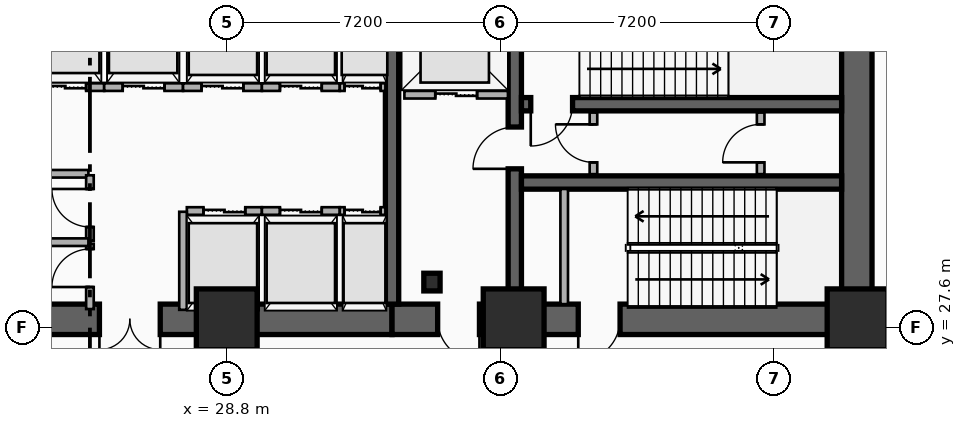
"""IFC4 building model, lengths in metres.
Left out: names, types, materials, properties, quantities, classifications, styles, units other than length and angle.
Written with IfcOpenShell. Run it as: python <this file> out.ifc"""

import sys

from ifc_helpers import new_model, si_unit, direction, frame, frame_2d, origin, origin_2d, place, context, subcontext, project, spatial, rectangle, i_section, extrude, element, fill, save


model = new_model("IFC4")
c1 = context("Model", 3, precision=1e-05, world=origin(), true_north=direction((0.0, 1.0)))
c2 = subcontext(c1, "Body", "Model", "MODEL_VIEW")
j1 = project(units=[si_unit("LENGTHUNIT", "METRE"), si_unit("PLANEANGLEUNIT", "RADIAN")], contexts=[c1])
p1 = place(None, origin())
s1 = spatial("IfcSite", under=j1, at=p1, CompositionType="ELEMENT")
p2 = place(p1, origin())
s2 = spatial("IfcBuilding", under=s1, at=p2, CompositionType="ELEMENT")
p3 = place(p2, origin())
s3 = spatial("IfcBuildingStorey", under=s2, at=p3, CompositionType="ELEMENT", Elevation=0.0)
p4 = place(p3, frame((33.15, 27.82, 0.0), z_axis=(0.0, 0.0, 1.0), x_axis=(-1.0, 0.0, 0.0)))
e1 = element("IfcWall", 1, at=p4, inside=s3, PredefinedType="SHEAR", context=c2, shape_type="SweptSolid", body=[
    extrude(rectangle(XDim=11.97, YDim=0.8, at=frame_2d((5.985, 0.0))), origin(), (0.0, 0.0, 1.0), 5.4),
])
p5 = place(p4, frame((6.1, 0.0, 0.0)))
e2 = element("IfcOpeningElement", 2, at=p5, cuts=e1, PredefinedType="OPENING", context=c2, shape_type="SweptSolid", body=[
    extrude(rectangle(XDim=1.6, YDim=2.2, at=frame_2d((0.8, 1.1))), frame((0.0, 0.41, 0.0), z_axis=(0.0, -1.0, 0.0), x_axis=(1.0, 0.0, 0.0)), (0.0, 0.0, 1.0), 0.82),
])
p6 = place(p3, frame((45.38, 27.82, 0.0), z_axis=(0.0, 0.0, 1.0), x_axis=(-1.0, 0.0, 0.0)))
e3 = element("IfcWall", 3, at=p6, inside=s3, PredefinedType="SHEAR", context=c2, shape_type="SweptSolid", body=[
    extrude(rectangle(XDim=12.23, YDim=0.8, at=frame_2d((6.115, 0.0))), origin(), (0.0, 0.0, 1.0), 5.4),
])
p7 = place(p6, frame((9.93, 0.0, 0.0)))
e4 = element("IfcOpeningElement", 4, at=p7, cuts=e3, PredefinedType="OPENING", context=c2, shape_type="SweptSolid", body=[
    extrude(rectangle(XDim=1.1, YDim=2.15, at=frame_2d((0.55, 1.075))), frame((0.0, 0.41, 0.0), z_axis=(0.0, -1.0, 0.0), x_axis=(1.0, 0.0, 0.0)), (0.0, 0.0, 1.0), 0.82),
])
p8 = place(p6, frame((6.23, 0.0, 0.0)))
e5 = element("IfcOpeningElement", 5, at=p8, cuts=e3, PredefinedType="OPENING", context=c2, shape_type="SweptSolid", body=[
    extrude(rectangle(XDim=1.1, YDim=2.15, at=frame_2d((0.55, 1.075))), frame((0.0, 0.41, 0.0), z_axis=(0.0, -1.0, 0.0), x_axis=(1.0, 0.0, 0.0)), (0.0, 0.0, 1.0), 0.82),
])
p9 = place(p3, frame((45.38, 28.22, 0.0), z_axis=(0.0, 0.0, 1.0), x_axis=(0.0, 1.0, 0.0)))
e6 = element("IfcWall", 6, at=p9, inside=s3, PredefinedType="SHEAR", context=c2, shape_type="SweptSolid", body=[
    extrude(rectangle(XDim=8.43, YDim=0.8, at=frame_2d((4.215, 0.0))), origin(), (0.0, 0.0, 1.0), 5.4),
])
p10 = place(p3, frame((33.15, 28.22, 0.0), z_axis=(0.0, 0.0, 1.0), x_axis=(0.0, 1.0, 0.0)))
e7 = element("IfcWall", 7, at=p10, inside=s3, PredefinedType="SHEAR", context=c2, shape_type="SweptSolid", body=[
    extrude(rectangle(XDim=8.43, YDim=0.35, at=frame_2d((4.215, 0.0))), origin(), (0.0, 0.0, 1.0), 5.4),
])
p11 = place(p3, frame((36.38, 28.22, 0.0), z_axis=(0.0, 0.0, 1.0), x_axis=(0.0, 1.0, 0.0)))
e8 = element("IfcWall", 8, at=p11, inside=s3, PredefinedType="SHEAR", context=c2, shape_type="SweptSolid", body=[
    extrude(rectangle(XDim=8.43, YDim=0.35, at=frame_2d((4.215, 0.0))), origin(), (0.0, 0.0, 1.0), 5.4),
])
p12 = place(p11, frame((3.56, 0.0, 0.0)))
e9 = element("IfcOpeningElement", 9, at=p12, cuts=e8, PredefinedType="OPENING", context=c2, shape_type="SweptSolid", body=[
    extrude(rectangle(XDim=1.1, YDim=2.15, at=frame_2d((0.55, 1.075))), frame((0.0, 0.185, 0.0), z_axis=(0.0, -1.0, 0.0), x_axis=(1.0, 0.0, 0.0)), (0.0, 0.0, 1.0), 0.37),
])
p13 = place(p3, frame((44.98, 33.48, 0.0), z_axis=(0.0, 0.0, 1.0), x_axis=(-1.0, 0.0, 0.0)))
e10 = element("IfcWall", 10, at=p13, inside=s3, PredefinedType="SHEAR", context=c2, shape_type="SweptSolid", body=[
    extrude(rectangle(XDim=8.425, YDim=0.35, at=frame_2d((4.212, 0.0))), origin(), (0.0, 0.0, 1.0), 5.4),
])
p14 = place(p13, frame((7.08, 0.0, 0.0)))
e11 = element("IfcOpeningElement", 11, at=p14, cuts=e10, PredefinedType="OPENING", context=c2, shape_type="SweptSolid", body=[
    extrude(rectangle(XDim=1.1, YDim=2.15, at=frame_2d((0.55, 1.075))), frame((0.0, 0.185, 0.0), z_axis=(0.0, -1.0, 0.0), x_axis=(1.0, 0.0, 0.0)), (0.0, 0.0, 1.0), 0.37),
])
p15 = place(p3, frame((36.555, 31.42, 0.0), z_axis=(0.0, 0.0, 1.0), x_axis=(1.0, 0.0, 0.0)))
e12 = element("IfcWall", 12, at=p15, inside=s3, PredefinedType="SHEAR", context=c2, shape_type="SweptSolid", body=[
    extrude(rectangle(XDim=8.425, YDim=0.35, at=frame_2d((4.212, 0.0))), origin(), (0.0, 0.0, 1.0), 5.4),
])
p16 = place(p3, frame((34.2, 28.8, 0.0), z_axis=(0.0, 0.0, 1.0), x_axis=(1.0, 0.0, 0.0)))
e13 = element("IfcColumn", 13, at=p16, inside=s3, PredefinedType="COLUMN", context=c2, shape_type="SweptSolid", body=[
    extrude(i_section(OverallWidth=0.428, OverallDepth=0.465, WebThickness=0.045, FlangeThickness=0.073, FilletRadius=0.015, at=origin_2d()), origin(), (0.0, 0.0, 1.0), 5.4),
])
for number, where, z_axis, x_axis in (
    (14, (28.8, 27.82, 0.0), (0.0, 0.0, 1.0), (1.0, 0.0, 0.0)),
    (15, (36.35, 27.82, 0.0), (0.0, 0.0, 1.0), (1.0, 0.0, 0.0)),
    (16, (45.4, 27.82, 0.0), (0.0, 0.0, 1.0), (1.0, 0.0, 0.0)),
):
    element("IfcColumn", number, at=place(p3, frame(where, z_axis=z_axis, x_axis=x_axis)), inside=s3, PredefinedType="COLUMN", context=c2, shape_type="SweptSolid", body=[
        extrude(rectangle(XDim=1.6, YDim=1.6, at=origin_2d()), origin(), (0.0, 0.0, 1.0), 5.4),
    ])
p17 = place(p3, frame((33.475, 33.73, 0.0), z_axis=(0.0, 0.0, 1.0), x_axis=(1.0, 0.0, 0.0)))
e17 = element("IfcWall", 17, at=p17, inside=s3, PredefinedType="PARTITIONING", context=c2, shape_type="SweptSolid", body=[
    extrude(rectangle(XDim=2.725, YDim=0.2, at=frame_2d((1.362, 0.0))), origin(), (0.0, 0.0, 1.0), 4.072),
])
p18 = place(p17, frame((0.812, 0.0, 0.0)))
e18 = element("IfcOpeningElement", 18, at=p18, cuts=e17, PredefinedType="OPENING", context=c2, shape_type="SweptSolid", body=[
    extrude(rectangle(XDim=1.1, YDim=2.15, at=frame_2d((0.55, 1.075))), frame((0.0, 0.11, 0.0), z_axis=(0.0, -1.0, 0.0), x_axis=(1.0, 0.0, 0.0)), (0.0, 0.0, 1.0), 0.22),
])
p19 = place(p3, frame((27.75, 30.67, 0.0), z_axis=(0.0, 0.0, 1.0), x_axis=(1.0, 0.0, 0.0)))
e19 = element("IfcWall", 19, at=p19, inside=s3, PredefinedType="PARTITIONING", context=c2, shape_type="SweptSolid", body=[
    extrude(rectangle(XDim=1.975, YDim=0.2, at=frame_2d((0.988, 0.0))), origin(), (0.0, 0.0, 1.0), 4.072),
])
p20 = place(p19, frame((0.438, 0.0, 0.0)))
e20 = element("IfcOpeningElement", 20, at=p20, cuts=e19, PredefinedType="OPENING", context=c2, shape_type="SweptSolid", body=[
    extrude(rectangle(XDim=1.1, YDim=2.15, at=frame_2d((0.55, 1.075))), frame((0.0, 0.11, 0.0), z_axis=(0.0, -1.0, 0.0), x_axis=(1.0, 0.0, 0.0)), (0.0, 0.0, 1.0), 0.22),
])
p21 = place(p3, frame((27.65, 28.07, 0.0), z_axis=(0.0, 0.0, 1.0), x_axis=(0.0, 1.0, 0.0)))
e21 = element("IfcWall", 21, at=p21, inside=s3, PredefinedType="PARTITIONING", context=c2, shape_type="SweptSolid", body=[
    extrude(rectangle(XDim=2.58, YDim=0.2, at=frame_2d((1.29, 0.0))), origin(), (0.0, 0.0, 1.0), 4.072),
])
p22 = place(p3, frame((29.725, 30.67, 0.0), z_axis=(0.0, 0.0, 1.0), x_axis=(1.0, 0.0, 0.0)))
e22 = element("IfcWall", 22, at=p22, inside=s3, PredefinedType="PARTITIONING", context=c2, shape_type="SweptSolid", body=[
    extrude(rectangle(XDim=2.05, YDim=0.2, at=frame_2d((1.025, 0.0))), origin(), (0.0, 0.0, 1.0), 5.1),
])
p23 = place(p22, frame((0.475, 0.0, 0.0)))
e23 = element("IfcOpeningElement", 23, at=p23, cuts=e22, PredefinedType="OPENING", context=c2, shape_type="SweptSolid", body=[
    extrude(rectangle(XDim=1.1, YDim=2.15, at=frame_2d((0.55, 1.075))), frame((0.0, 0.11, 0.0), z_axis=(0.0, -1.0, 0.0), x_axis=(1.0, 0.0, 0.0)), (0.0, 0.0, 1.0), 0.22),
])
p24 = place(p3, frame((31.775, 30.67, 0.0), z_axis=(0.0, 0.0, 1.0), x_axis=(1.0, 0.0, 0.0)))
e24 = element("IfcWall", 24, at=p24, inside=s3, PredefinedType="PARTITIONING", context=c2, shape_type="SweptSolid", body=[
    extrude(rectangle(XDim=1.2, YDim=0.2, at=frame_2d((0.6, 0.0))), origin(), (0.0, 0.0, 1.0), 5.1),
])
p25 = place(p24, frame((0.125, 0.0, 0.0)))
e25 = element("IfcOpeningElement", 25, at=p25, cuts=e24, PredefinedType="OPENING", context=c2, shape_type="SweptSolid", body=[
    extrude(rectangle(XDim=0.95, YDim=2.15, at=frame_2d((0.475, 1.075))), frame((0.0, 0.11, 0.0), z_axis=(0.0, -1.0, 0.0), x_axis=(1.0, 0.0, 0.0)), (0.0, 0.0, 1.0), 0.22),
])
p26 = place(p3, frame((23.525, 33.93, 0.0), z_axis=(0.0, 0.0, 1.0), x_axis=(1.0, 0.0, 0.0)))
e26 = element("IfcWall", 26, at=p26, inside=s3, PredefinedType="PARTITIONING", context=c2, shape_type="SweptSolid", body=[
    extrude(rectangle(XDim=2.05, YDim=0.2, at=frame_2d((1.025, 0.0))), origin(), (0.0, 0.0, 1.0), 5.1),
])
p27 = place(p26, frame((0.475, 0.0, 0.0)))
e27 = element("IfcOpeningElement", 27, at=p27, cuts=e26, PredefinedType="OPENING", context=c2, shape_type="SweptSolid", body=[
    extrude(rectangle(XDim=1.1, YDim=2.15, at=frame_2d((0.55, 1.075))), frame((0.0, 0.11, 0.0), z_axis=(0.0, -1.0, 0.0), x_axis=(1.0, 0.0, 0.0)), (0.0, 0.0, 1.0), 0.22),
])
p28 = place(p3, frame((25.575, 33.93, 0.0), z_axis=(0.0, 0.0, 1.0), x_axis=(1.0, 0.0, 0.0)))
e28 = element("IfcWall", 28, at=p28, inside=s3, PredefinedType="PARTITIONING", context=c2, shape_type="SweptSolid", body=[
    extrude(rectangle(XDim=2.075, YDim=0.2, at=frame_2d((1.038, 0.0))), origin(), (0.0, 0.0, 1.0), 5.1),
])
p29 = place(p28, frame((0.488, 0.0, 0.0)))
e29 = element("IfcOpeningElement", 29, at=p29, cuts=e28, PredefinedType="OPENING", context=c2, shape_type="SweptSolid", body=[
    extrude(rectangle(XDim=1.1, YDim=2.15, at=frame_2d((0.55, 1.075))), frame((0.0, 0.11, 0.0), z_axis=(0.0, -1.0, 0.0), x_axis=(1.0, 0.0, 0.0)), (0.0, 0.0, 1.0), 0.22),
])
p30 = place(p3, frame((27.65, 33.93, 0.0), z_axis=(0.0, 0.0, 1.0), x_axis=(1.0, 0.0, 0.0)))
e30 = element("IfcWall", 30, at=p30, inside=s3, PredefinedType="PARTITIONING", context=c2, shape_type="SweptSolid", body=[
    extrude(rectangle(XDim=2.075, YDim=0.2, at=frame_2d((1.038, 0.0))), origin(), (0.0, 0.0, 1.0), 4.072),
])
p31 = place(p30, frame((0.488, 0.0, 0.0)))
e31 = element("IfcOpeningElement", 31, at=p31, cuts=e30, PredefinedType="OPENING", context=c2, shape_type="SweptSolid", body=[
    extrude(rectangle(XDim=1.1, YDim=2.15, at=frame_2d((0.55, 1.075))), frame((0.0, 0.11, 0.0), z_axis=(0.0, -1.0, 0.0), x_axis=(1.0, 0.0, 0.0)), (0.0, 0.0, 1.0), 0.22),
])
p32 = place(p3, frame((29.725, 33.93, 0.0), z_axis=(0.0, 0.0, 1.0), x_axis=(1.0, 0.0, 0.0)))
e32 = element("IfcWall", 32, at=p32, inside=s3, PredefinedType="PARTITIONING", context=c2, shape_type="SweptSolid", body=[
    extrude(rectangle(XDim=2.05, YDim=0.2, at=frame_2d((1.025, 0.0))), origin(), (0.0, 0.0, 1.0), 5.1),
])
p33 = place(p32, frame((0.475, 0.0, 0.0)))
e33 = element("IfcOpeningElement", 33, at=p33, cuts=e32, PredefinedType="OPENING", context=c2, shape_type="SweptSolid", body=[
    extrude(rectangle(XDim=1.1, YDim=2.15, at=frame_2d((0.55, 1.075))), frame((0.0, 0.11, 0.0), z_axis=(0.0, -1.0, 0.0), x_axis=(1.0, 0.0, 0.0)), (0.0, 0.0, 1.0), 0.22),
])
p34 = place(p3, frame((31.775, 33.93, 0.0), z_axis=(0.0, 0.0, 1.0), x_axis=(1.0, 0.0, 0.0)))
e34 = element("IfcWall", 34, at=p34, inside=s3, PredefinedType="PARTITIONING", context=c2, shape_type="SweptSolid", body=[
    extrude(rectangle(XDim=1.2, YDim=0.2, at=frame_2d((0.6, 0.0))), origin(), (0.0, 0.0, 1.0), 5.1),
])
p35 = place(p34, frame((0.125, 0.0, 0.0)))
e35 = element("IfcOpeningElement", 35, at=p35, cuts=e34, PredefinedType="OPENING", context=c2, shape_type="SweptSolid", body=[
    extrude(rectangle(XDim=0.95, YDim=2.15, at=frame_2d((0.475, 1.075))), frame((0.0, 0.11, 0.0), z_axis=(0.0, -1.0, 0.0), x_axis=(1.0, 0.0, 0.0)), (0.0, 0.0, 1.0), 0.22),
])
p36 = place(p3, frame((37.68, 28.22, 0.0), z_axis=(0.0, 0.0, 1.0), x_axis=(0.0, 1.0, 0.0)))
e36 = element("IfcWall", 36, at=p36, inside=s3, PredefinedType="PARTITIONING", context=c2, shape_type="SweptSolid", body=[
    extrude(rectangle(XDim=3.03, YDim=0.2, at=frame_2d((1.515, 0.0))), origin(), (0.0, 0.0, 1.0), 5.1),
])
p37 = place(p3, frame((38.45, 31.64, 0.0), z_axis=(0.0, 0.0, 1.0), x_axis=(0.0, 1.0, 0.0)))
e37 = element("IfcWall", 37, at=p37, inside=s3, PredefinedType="PARTITIONING", context=c2, shape_type="SweptSolid", body=[
    extrude(rectangle(XDim=1.62, YDim=0.2, at=frame_2d((0.81, 0.0))), origin(), (0.0, 0.0, 1.0), 5.1),
])
p38 = place(p37, frame((0.31, 0.0, 0.0)))
e38 = element("IfcOpeningElement", 38, at=p38, cuts=e37, PredefinedType="OPENING", context=c2, shape_type="SweptSolid", body=[
    extrude(rectangle(XDim=1.0, YDim=2.15, at=frame_2d((0.5, 1.075))), frame((0.0, 0.11, 0.0), z_axis=(0.0, -1.0, 0.0), x_axis=(1.0, 0.0, 0.0)), (0.0, 0.0, 1.0), 0.22),
])
p39 = place(p3, frame((42.85, 31.64, 0.0), z_axis=(0.0, 0.0, 1.0), x_axis=(0.0, 1.0, 0.0)))
e39 = element("IfcWall", 39, at=p39, inside=s3, PredefinedType="PARTITIONING", context=c2, shape_type="SweptSolid", body=[
    extrude(rectangle(XDim=1.62, YDim=0.2, at=frame_2d((0.81, 0.0))), origin(), (0.0, 0.0, 1.0), 5.1),
])
p40 = place(p39, frame((0.31, 0.0, 0.0)))
e40 = element("IfcOpeningElement", 40, at=p40, cuts=e39, PredefinedType="OPENING", context=c2, shape_type="SweptSolid", body=[
    extrude(rectangle(XDim=1.0, YDim=2.15, at=frame_2d((0.5, 1.075))), frame((0.0, 0.11, 0.0), z_axis=(0.0, -1.0, 0.0), x_axis=(1.0, 0.0, 0.0)), (0.0, 0.0, 1.0), 0.22),
])
p41 = place(p3, frame((21.4, 31.65, 0.0), z_axis=(0.0, 0.0, 1.0), x_axis=(1.0, 0.0, 0.0)))
e41 = element("IfcWall", 41, at=p41, inside=s3, PredefinedType="PARTITIONING", context=c2, shape_type="SweptSolid", body=[
    extrude(rectangle(XDim=3.76, YDim=0.2, at=frame_2d((1.88, 0.0))), origin(), (0.0, 0.0, 1.0), 4.072),
])
p42 = place(p41, frame((1.28, 0.0, 0.0)))
e42 = element("IfcOpeningElement", 42, at=p42, cuts=e41, PredefinedType="OPENING", context=c2, shape_type="SweptSolid", body=[
    extrude(rectangle(XDim=1.2, YDim=2.15, at=frame_2d((0.6, 1.075))), frame((0.0, 0.11, 0.0), z_axis=(0.0, -1.0, 0.0), x_axis=(1.0, 0.0, 0.0)), (0.0, 0.0, 1.0), 0.22),
])
p43 = place(p3, frame((25.2, 28.09, 0.0), z_axis=(0.0, 0.0, 1.0), x_axis=(0.0, 1.0, 0.0)))
e43 = element("IfcWall", 43, at=p43, inside=s3, PredefinedType="PARTITIONING", context=c2, shape_type="SweptSolid", body=[
    extrude(rectangle(XDim=1.72, YDim=0.2, at=frame_2d((0.86, 0.0))), origin(), (0.0, 0.0, 1.0), 5.1),
])
p44 = place(p43, frame((0.58, 0.0, 0.0)))
e44 = element("IfcOpeningElement", 44, at=p44, cuts=e43, PredefinedType="OPENING", context=c2, shape_type="SweptSolid", body=[
    extrude(rectangle(XDim=1.0, YDim=2.15, at=frame_2d((0.5, 1.075))), frame((0.0, 0.11, 0.0), z_axis=(0.0, -1.0, 0.0), x_axis=(1.0, 0.0, 0.0)), (0.0, 0.0, 1.0), 0.22),
])
p45 = place(p3, frame((25.2, 29.89, 0.0), z_axis=(0.0, 0.0, 1.0), x_axis=(0.0, 1.0, 0.0)))
e45 = element("IfcWall", 45, at=p45, inside=s3, PredefinedType="PARTITIONING", context=c2, shape_type="SweptSolid", body=[
    extrude(rectangle(XDim=1.72, YDim=0.2, at=frame_2d((0.86, 0.0))), origin(), (0.0, 0.0, 1.0), 5.1),
])
p46 = place(p45, frame((0.36, 0.0, 0.0)))
e46 = element("IfcOpeningElement", 46, at=p46, cuts=e45, PredefinedType="OPENING", context=c2, shape_type="SweptSolid", body=[
    extrude(rectangle(XDim=1.0, YDim=2.15, at=frame_2d((0.5, 1.075))), frame((0.0, 0.11, 0.0), z_axis=(0.0, -1.0, 0.0), x_axis=(1.0, 0.0, 0.0)), (0.0, 0.0, 1.0), 0.22),
])
p47 = place(p3, frame((21.4, 29.85, 0.0), z_axis=(0.0, 0.0, 1.0), x_axis=(1.0, 0.0, 0.0)))
e47 = element("IfcWall", 47, at=p47, inside=s3, PredefinedType="PARTITIONING", context=c2, shape_type="SweptSolid", body=[
    extrude(rectangle(XDim=3.76, YDim=0.2, at=frame_2d((1.88, 0.0))), origin(), (0.0, 0.0, 1.0), 4.072),
])
p48 = place(p3, frame((45.41, 27.6, 0.0), z_axis=(0.0, 0.0, 1.0), x_axis=(1.0, 0.0, 0.0)))
e48 = element("IfcWall", 48, at=p48, inside=s3, PredefinedType="PARTITIONING", context=c2, shape_type="SweptSolid", body=[
    extrude(rectangle(XDim=0.91, YDim=0.16, at=frame_2d((0.455, 0.0))), origin(), (0.0, 0.0, 1.0), 4.072),
])
p49 = place(p18, origin())
e49 = element("IfcDoor", 49, at=p49, inside=s3, OperationType="DOUBLE_DOOR_SLIDING", PredefinedType="DOOR", context=c2, shape_type="SweptSolid", body=[
    extrude(rectangle(XDim=1.1, YDim=2.15, at=frame_2d((0.55, 1.075))), frame((0.0, 0.025, 0.0), z_axis=(0.0, -1.0, 0.0), x_axis=(1.0, 0.0, 0.0)), (0.0, 0.0, 1.0), 0.05),
])
fill(e18, e49)
p50 = place(p20, origin())
e50 = element("IfcDoor", 50, at=p50, inside=s3, OperationType="DOUBLE_DOOR_SLIDING", PredefinedType="DOOR", context=c2, shape_type="SweptSolid", body=[
    extrude(rectangle(XDim=1.1, YDim=2.15, at=frame_2d((0.55, 1.075))), frame((0.0, 0.025, 0.0), z_axis=(0.0, -1.0, 0.0), x_axis=(1.0, 0.0, 0.0)), (0.0, 0.0, 1.0), 0.05),
])
fill(e20, e50)
p51 = place(p23, origin())
e51 = element("IfcDoor", 51, at=p51, inside=s3, OperationType="DOUBLE_DOOR_SLIDING", PredefinedType="DOOR", context=c2, shape_type="SweptSolid", body=[
    extrude(rectangle(XDim=1.1, YDim=2.15, at=frame_2d((0.55, 1.075))), frame((0.0, 0.025, 0.0), z_axis=(0.0, -1.0, 0.0), x_axis=(1.0, 0.0, 0.0)), (0.0, 0.0, 1.0), 0.05),
])
fill(e23, e51)
p52 = place(p25, origin())
e52 = element("IfcDoor", 52, at=p52, inside=s3, OperationType="DOUBLE_DOOR_SLIDING", PredefinedType="DOOR", context=c2, shape_type="SweptSolid", body=[
    extrude(rectangle(XDim=0.95, YDim=2.15, at=frame_2d((0.475, 1.075))), frame((0.0, 0.025, 0.0), z_axis=(0.0, -1.0, 0.0), x_axis=(1.0, 0.0, 0.0)), (0.0, 0.0, 1.0), 0.05),
])
fill(e25, e52)
p53 = place(p27, origin())
e53 = element("IfcDoor", 53, at=p53, inside=s3, OperationType="DOUBLE_DOOR_SLIDING", PredefinedType="DOOR", context=c2, shape_type="SweptSolid", body=[
    extrude(rectangle(XDim=1.1, YDim=2.15, at=frame_2d((0.55, 1.075))), frame((0.0, 0.025, 0.0), z_axis=(0.0, -1.0, 0.0), x_axis=(1.0, 0.0, 0.0)), (0.0, 0.0, 1.0), 0.05),
])
fill(e27, e53)
p54 = place(p29, origin())
e54 = element("IfcDoor", 54, at=p54, inside=s3, OperationType="DOUBLE_DOOR_SLIDING", PredefinedType="DOOR", context=c2, shape_type="SweptSolid", body=[
    extrude(rectangle(XDim=1.1, YDim=2.15, at=frame_2d((0.55, 1.075))), frame((0.0, 0.025, 0.0), z_axis=(0.0, -1.0, 0.0), x_axis=(1.0, 0.0, 0.0)), (0.0, 0.0, 1.0), 0.05),
])
fill(e29, e54)
p55 = place(p31, origin())
e55 = element("IfcDoor", 55, at=p55, inside=s3, OperationType="DOUBLE_DOOR_SLIDING", PredefinedType="DOOR", context=c2, shape_type="SweptSolid", body=[
    extrude(rectangle(XDim=1.1, YDim=2.15, at=frame_2d((0.55, 1.075))), frame((0.0, 0.025, 0.0), z_axis=(0.0, -1.0, 0.0), x_axis=(1.0, 0.0, 0.0)), (0.0, 0.0, 1.0), 0.05),
])
fill(e31, e55)
p56 = place(p33, origin())
e56 = element("IfcDoor", 56, at=p56, inside=s3, OperationType="DOUBLE_DOOR_SLIDING", PredefinedType="DOOR", context=c2, shape_type="SweptSolid", body=[
    extrude(rectangle(XDim=1.1, YDim=2.15, at=frame_2d((0.55, 1.075))), frame((0.0, 0.025, 0.0), z_axis=(0.0, -1.0, 0.0), x_axis=(1.0, 0.0, 0.0)), (0.0, 0.0, 1.0), 0.05),
])
fill(e33, e56)
p57 = place(p35, origin())
e57 = element("IfcDoor", 57, at=p57, inside=s3, OperationType="DOUBLE_DOOR_SLIDING", PredefinedType="DOOR", context=c2, shape_type="SweptSolid", body=[
    extrude(rectangle(XDim=0.95, YDim=2.15, at=frame_2d((0.475, 1.075))), frame((0.0, 0.025, 0.0), z_axis=(0.0, -1.0, 0.0), x_axis=(1.0, 0.0, 0.0)), (0.0, 0.0, 1.0), 0.05),
])
fill(e35, e57)
p58 = place(p14, origin())
e58 = element("IfcDoor", 58, at=p58, inside=s3, OperationType="SINGLE_SWING_RIGHT", PredefinedType="DOOR", context=c2, shape_type="SweptSolid", body=[
    extrude(rectangle(XDim=1.1, YDim=2.15, at=frame_2d((0.55, 1.075))), frame((0.0, 0.025, 0.0), z_axis=(0.0, -1.0, 0.0), x_axis=(1.0, 0.0, 0.0)), (0.0, 0.0, 1.0), 0.05),
])
fill(e11, e58)
p59 = place(p12, origin())
e59 = element("IfcDoor", 59, at=p59, inside=s3, OperationType="SINGLE_SWING_LEFT", PredefinedType="DOOR", context=c2, shape_type="SweptSolid", body=[
    extrude(rectangle(XDim=1.1, YDim=2.15, at=frame_2d((0.55, 1.075))), frame((0.0, 0.025, 0.0), z_axis=(0.0, -1.0, 0.0), x_axis=(1.0, 0.0, 0.0)), (0.0, 0.0, 1.0), 0.05),
])
fill(e9, e59)
p60 = place(p7, origin())
e60 = element("IfcDoor", 60, at=p60, inside=s3, OperationType="SINGLE_SWING_LEFT", PredefinedType="DOOR", context=c2, shape_type="SweptSolid", body=[
    extrude(rectangle(XDim=1.1, YDim=2.15, at=frame_2d((0.55, 1.075))), frame((0.0, 0.025, 0.0), z_axis=(0.0, -1.0, 0.0), x_axis=(1.0, 0.0, 0.0)), (0.0, 0.0, 1.0), 0.05),
])
fill(e4, e60)
p61 = place(p8, origin())
e61 = element("IfcDoor", 61, at=p61, inside=s3, OperationType="SINGLE_SWING_RIGHT", PredefinedType="DOOR", context=c2, shape_type="SweptSolid", body=[
    extrude(rectangle(XDim=1.1, YDim=2.15, at=frame_2d((0.55, 1.075))), frame((0.0, 0.025, 0.0), z_axis=(0.0, -1.0, 0.0), x_axis=(1.0, 0.0, 0.0)), (0.0, 0.0, 1.0), 0.05),
])
fill(e5, e61)
p62 = place(p5, origin())
e62 = element("IfcDoor", 62, at=p62, inside=s3, OperationType="SINGLE_SWING_LEFT", PredefinedType="DOOR", context=c2, shape_type="SweptSolid", body=[
    extrude(rectangle(XDim=1.6, YDim=2.2, at=frame_2d((0.8, 1.1))), frame((0.0, 0.025, 0.0), z_axis=(0.0, -1.0, 0.0), x_axis=(1.0, 0.0, 0.0)), (0.0, 0.0, 1.0), 0.05),
])
fill(e2, e62)
p63 = place(p38, origin())
e63 = element("IfcDoor", 63, at=p63, inside=s3, OperationType="SINGLE_SWING_RIGHT", PredefinedType="DOOR", context=c2, shape_type="SweptSolid", body=[
    extrude(rectangle(XDim=1.0, YDim=2.15, at=frame_2d((0.5, 1.075))), frame((0.0, 0.025, 0.0), z_axis=(0.0, -1.0, 0.0), x_axis=(1.0, 0.0, 0.0)), (0.0, 0.0, 1.0), 0.05),
])
fill(e38, e63)
p64 = place(p40, origin())
e64 = element("IfcDoor", 64, at=p64, inside=s3, OperationType="SINGLE_SWING_LEFT", PredefinedType="DOOR", context=c2, shape_type="SweptSolid", body=[
    extrude(rectangle(XDim=1.0, YDim=2.15, at=frame_2d((0.5, 1.075))), frame((0.0, 0.025, 0.0), z_axis=(0.0, -1.0, 0.0), x_axis=(1.0, 0.0, 0.0)), (0.0, 0.0, 1.0), 0.05),
])
fill(e40, e64)
p65 = place(p44, origin())
e65 = element("IfcDoor", 65, at=p65, inside=s3, OperationType="SINGLE_SWING_LEFT", PredefinedType="DOOR", context=c2, shape_type="SweptSolid", body=[
    extrude(rectangle(XDim=1.0, YDim=2.15, at=frame_2d((0.5, 1.075))), frame((0.0, 0.025, 0.0), z_axis=(0.0, -1.0, 0.0), x_axis=(1.0, 0.0, 0.0)), (0.0, 0.0, 1.0), 0.05),
])
fill(e44, e65)
p66 = place(p46, origin())
e66 = element("IfcDoor", 66, at=p66, inside=s3, OperationType="SINGLE_SWING_RIGHT", PredefinedType="DOOR", context=c2, shape_type="SweptSolid", body=[
    extrude(rectangle(XDim=1.0, YDim=2.15, at=frame_2d((0.5, 1.075))), frame((0.0, 0.025, 0.0), z_axis=(0.0, -1.0, 0.0), x_axis=(1.0, 0.0, 0.0)), (0.0, 0.0, 1.0), 0.05),
])
fill(e46, e66)
save(model, sys.argv[1])
